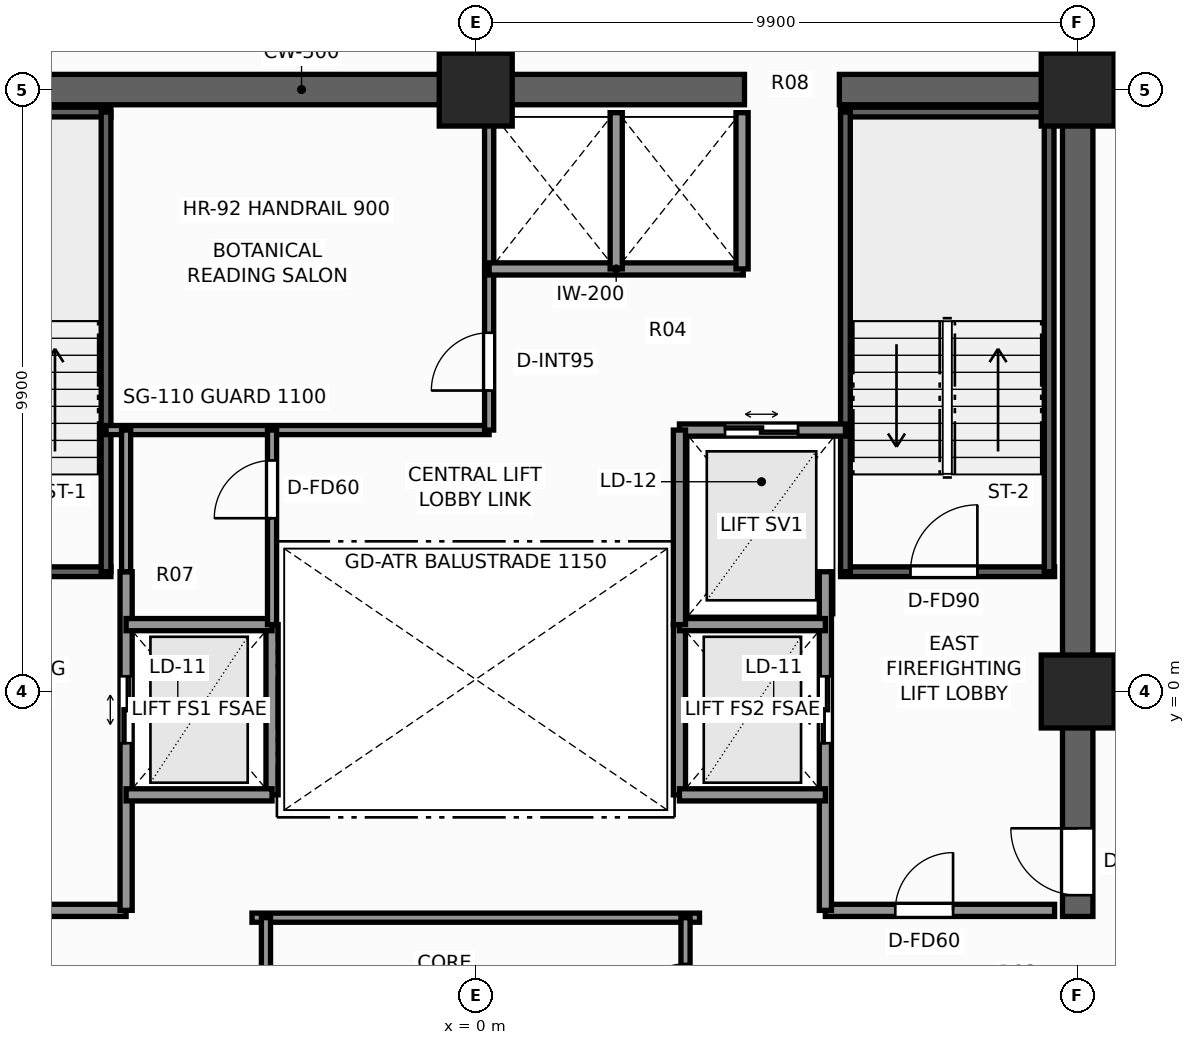
"""IFC4 building model, lengths in metres.
Left out: names, types, materials, properties, quantities, classifications, styles, units other than length and angle.
Written with IfcOpenShell. Run it as: python <this file> out.ifc"""

import sys

from ifc_helpers import new_model, si_unit, direction, frame, frame_2d, origin, origin_2d, place, context, subcontext, project, spatial, rectangle, extrude, element, fill, save


model = new_model("IFC4")
c1 = context("Model", 3, precision=1e-05, world=origin(), true_north=direction((0.0, 1.0)))
c2 = subcontext(c1, "Body", "Model", "MODEL_VIEW")
j1 = project(units=[si_unit("LENGTHUNIT", "METRE"), si_unit("PLANEANGLEUNIT", "RADIAN")], contexts=[c1])
p1 = place(None, origin())
s1 = spatial("IfcSite", under=j1, at=p1, CompositionType="ELEMENT")
p2 = place(p1, origin())
s2 = spatial("IfcBuilding", under=s1, at=p2, CompositionType="ELEMENT")
p3 = place(p2, frame((0.0, 0.0, 118.4)))
s3 = spatial("IfcBuildingStorey", under=s2, at=p3, CompositionType="ELEMENT", Elevation=118.4)
p4 = place(p3, frame((-10.15, 9.9, 0.0), z_axis=(0.0, 0.0, 1.0), x_axis=(1.0, 0.0, 0.0)))
e1 = element("IfcWall", 1, at=p4, inside=s3, PredefinedType="SHEAR", context=c2, shape_type="SweptSolid", body=[
    extrude(rectangle(XDim=14.57, YDim=0.5, at=frame_2d((7.285, 0.0))), origin(), (0.0, 0.0, 1.0), 3.3),
])
p5 = place(p3, frame((5.98, 9.9, 0.0), z_axis=(0.0, 0.0, 1.0), x_axis=(1.0, 0.0, 0.0)))
e2 = element("IfcWall", 2, at=p5, inside=s3, PredefinedType="SHEAR", context=c2, shape_type="SweptSolid", body=[
    extrude(rectangle(XDim=4.17, YDim=0.5, at=frame_2d((2.085, 0.0))), origin(), (0.0, 0.0, 1.0), 3.3),
])
p6 = place(p3, frame((9.9, -3.7, 0.0), z_axis=(0.0, 0.0, 1.0), x_axis=(0.0, 1.0, 0.0)))
e3 = element("IfcWall", 3, at=p6, inside=s3, PredefinedType="SHEAR", context=c2, shape_type="SweptSolid", body=[
    extrude(rectangle(XDim=13.35, YDim=0.5, at=frame_2d((6.675, 0.0))), origin(), (0.0, 0.0, 1.0), 3.3),
])
p7 = place(p6, frame((0.35, 0.0, 0.0)))
e4 = element("IfcOpeningElement", 4, at=p7, cuts=e3, PredefinedType="OPENING", context=c2, shape_type="SweptSolid", body=[
    extrude(rectangle(XDim=1.1, YDim=2.2, at=frame_2d((0.55, 1.1))), frame((0.0, 0.26, 0.0), z_axis=(0.0, -1.0, 0.0), x_axis=(1.0, 0.0, 0.0)), (0.0, 0.0, 1.0), 0.52),
])
for number, where, z_axis, x_axis in (
    (5, (9.9, 9.9, 0.0), (0.0, 0.0, 1.0), (1.0, 0.0, 0.0)),
    (6, (9.9, 0.0, 0.0), (0.0, 0.0, 1.0), (1.0, 0.0, 0.0)),
    (7, (0.0, 9.9, 0.0), (0.0, 0.0, 1.0), (1.0, 0.0, 0.0)),
):
    element("IfcColumn", number, at=place(p3, frame(where, z_axis=z_axis, x_axis=x_axis)), inside=s3, PredefinedType="COLUMN", context=c2, shape_type="SweptSolid", body=[
        extrude(rectangle(XDim=1.2, YDim=1.2, at=origin_2d()), origin(), (0.0, 0.0, 1.0), 3.3),
    ])
p8 = place(p3, frame((-9.52, 1.97, 0.0), z_axis=(0.0, 0.0, 1.0), x_axis=(1.0, 0.0, 0.0)))
e8 = element("IfcWall", 8, at=p8, inside=s3, PredefinedType="SHEAR", context=c2, shape_type="SweptSolid", body=[
    extrude(rectangle(XDim=3.52, YDim=0.16, at=frame_2d((1.76, 0.0))), origin(), (0.0, 0.0, 1.0), 3.3),
])
p9 = place(p8, frame((1.15, 0.0, 0.0)))
e9 = element("IfcOpeningElement", 9, at=p9, cuts=e8, PredefinedType="OPENING", context=c2, shape_type="SweptSolid", body=[
    extrude(rectangle(XDim=1.1, YDim=2.2, at=frame_2d((0.55, 1.1))), frame((0.0, 0.09, 0.0), z_axis=(0.0, -1.0, 0.0), x_axis=(1.0, 0.0, 0.0)), (0.0, 0.0, 1.0), 0.18),
])
p10 = place(p3, frame((-9.52, 9.53, 0.0), z_axis=(0.0, 0.0, 1.0), x_axis=(1.0, 0.0, 0.0)))
e10 = element("IfcWall", 10, at=p10, inside=s3, PredefinedType="SHEAR", context=c2, shape_type="SweptSolid", body=[
    extrude(rectangle(XDim=3.52, YDim=0.16, at=frame_2d((1.76, 0.0))), origin(), (0.0, 0.0, 1.0), 3.3),
])
p11 = place(p3, frame((-6.08, 1.97, 0.0), z_axis=(0.0, 0.0, 1.0), x_axis=(0.0, 1.0, 0.0)))
e11 = element("IfcWall", 11, at=p11, inside=s3, PredefinedType="SHEAR", context=c2, shape_type="SweptSolid", body=[
    extrude(rectangle(XDim=7.56, YDim=0.16, at=frame_2d((3.78, 0.0))), origin(), (0.0, 0.0, 1.0), 3.3),
])
p12 = place(p3, frame((6.0, 1.97, 0.0), z_axis=(0.0, 0.0, 1.0), x_axis=(1.0, 0.0, 0.0)))
e12 = element("IfcWall", 12, at=p12, inside=s3, PredefinedType="SHEAR", context=c2, shape_type="SweptSolid", body=[
    extrude(rectangle(XDim=3.52, YDim=0.16, at=frame_2d((1.76, 0.0))), origin(), (0.0, 0.0, 1.0), 3.3),
])
p13 = place(p12, frame((1.15, 0.0, 0.0)))
e13 = element("IfcOpeningElement", 13, at=p13, cuts=e12, PredefinedType="OPENING", context=c2, shape_type="SweptSolid", body=[
    extrude(rectangle(XDim=1.1, YDim=2.2, at=frame_2d((0.55, 1.1))), frame((0.0, 0.09, 0.0), z_axis=(0.0, -1.0, 0.0), x_axis=(1.0, 0.0, 0.0)), (0.0, 0.0, 1.0), 0.18),
])
p14 = place(p3, frame((6.0, 9.53, 0.0), z_axis=(0.0, 0.0, 1.0), x_axis=(1.0, 0.0, 0.0)))
e14 = element("IfcWall", 14, at=p14, inside=s3, PredefinedType="SHEAR", context=c2, shape_type="SweptSolid", body=[
    extrude(rectangle(XDim=3.52, YDim=0.16, at=frame_2d((1.76, 0.0))), origin(), (0.0, 0.0, 1.0), 3.3),
])
for number, where, z_axis, x_axis in (
    (15, (6.08, 1.97, 0.0), (0.0, 0.0, 1.0), (0.0, 1.0, 0.0)),
    (16, (9.43, 1.97, 0.0), (0.0, 0.0, 1.0), (0.0, 1.0, 0.0)),
):
    element("IfcWall", number, at=place(p3, frame(where, z_axis=z_axis, x_axis=x_axis)), inside=s3, PredefinedType="SHEAR", context=c2, shape_type="SweptSolid", body=[
        extrude(rectangle(XDim=7.56, YDim=0.16, at=frame_2d((3.78, 0.0))), origin(), (0.0, 0.0, 1.0), 3.3),
    ])
p15 = place(p3, frame((-9.52, -3.6, 0.0), z_axis=(0.0, 0.0, 1.0), x_axis=(1.0, 0.0, 0.0)))
e17 = element("IfcWall", 17, at=p15, inside=s3, PredefinedType="SOLIDWALL", context=c2, shape_type="SweptSolid", body=[
    extrude(rectangle(XDim=3.77, YDim=0.2, at=frame_2d((1.885, 0.0))), origin(), (0.0, 0.0, 1.0), 3.08),
])
p16 = place(p15, frame((1.15, 0.0, 0.0)))
e18 = element("IfcOpeningElement", 18, at=p16, cuts=e17, PredefinedType="OPENING", context=c2, shape_type="SweptSolid", body=[
    extrude(rectangle(XDim=0.95, YDim=2.06, at=frame_2d((0.475, 1.03))), frame((0.0, 0.11, 0.0), z_axis=(0.0, -1.0, 0.0), x_axis=(1.0, 0.0, 0.0)), (0.0, 0.0, 1.0), 0.22),
])
p17 = place(p3, frame((-5.75, -3.6, 0.0), z_axis=(0.0, 0.0, 1.0), x_axis=(0.0, 1.0, 0.0)))
e19 = element("IfcWall", 19, at=p17, inside=s3, PredefinedType="SOLIDWALL", context=c2, shape_type="SweptSolid", body=[
    extrude(rectangle(XDim=5.57, YDim=0.2, at=frame_2d((2.785, 0.0))), origin(), (0.0, 0.0, 1.0), 2.715),
])
p18 = place(p17, frame((2.75, 0.0, 0.0)))
e20 = element("IfcOpeningElement", 20, at=p18, cuts=e19, PredefinedType="OPENING", context=c2, shape_type="SweptSolid", body=[
    extrude(rectangle(XDim=1.1, YDim=2.2, at=frame_2d((0.55, 1.1))), frame((0.0, 0.11, 0.0), z_axis=(0.0, -1.0, 0.0), x_axis=(1.0, 0.0, 0.0)), (0.0, 0.0, 1.0), 0.22),
])
p19 = place(p3, frame((-3.35, -1.7, 0.0), z_axis=(0.0, 0.0, 1.0), x_axis=(0.0, 1.0, 0.0)))
e21 = element("IfcWall", 21, at=p19, inside=s3, PredefinedType="SOLIDWALL", context=c2, shape_type="SweptSolid", body=[
    extrude(rectangle(XDim=2.8, YDim=0.2, at=frame_2d((1.4, 0.0))), origin(), (0.0, 0.0, 1.0), 2.715),
])
for number, where, z_axis, x_axis in (
    (22, (-5.75, -1.7, 0.0), (0.0, 0.0, 1.0), (1.0, 0.0, 0.0)),
    (23, (-5.75, 1.1, 0.0), (0.0, 0.0, 1.0), (1.0, 0.0, 0.0)),
):
    element("IfcWall", number, at=place(p3, frame(where, z_axis=z_axis, x_axis=x_axis)), inside=s3, PredefinedType="SOLIDWALL", context=c2, shape_type="SweptSolid", body=[
        extrude(rectangle(XDim=2.4, YDim=0.2, at=frame_2d((1.2, 0.0))), origin(), (0.0, 0.0, 1.0), 3.08),
    ])
p20 = place(p3, frame((5.75, -3.6, 0.0), z_axis=(0.0, 0.0, 1.0), x_axis=(1.0, 0.0, 0.0)))
e24 = element("IfcWall", 24, at=p20, inside=s3, PredefinedType="SOLIDWALL", context=c2, shape_type="SweptSolid", body=[
    extrude(rectangle(XDim=3.77, YDim=0.2, at=frame_2d((1.885, 0.0))), origin(), (0.0, 0.0, 1.0), 3.08),
])
p21 = place(p20, frame((1.15, 0.0, 0.0)))
e25 = element("IfcOpeningElement", 25, at=p21, cuts=e24, PredefinedType="OPENING", context=c2, shape_type="SweptSolid", body=[
    extrude(rectangle(XDim=0.95, YDim=2.06, at=frame_2d((0.475, 1.03))), frame((0.0, 0.11, 0.0), z_axis=(0.0, -1.0, 0.0), x_axis=(1.0, 0.0, 0.0)), (0.0, 0.0, 1.0), 0.22),
])
p22 = place(p3, frame((5.75, -3.6, 0.0), z_axis=(0.0, 0.0, 1.0), x_axis=(0.0, 1.0, 0.0)))
e26 = element("IfcWall", 26, at=p22, inside=s3, PredefinedType="SOLIDWALL", context=c2, shape_type="SweptSolid", body=[
    extrude(rectangle(XDim=5.57, YDim=0.2, at=frame_2d((2.785, 0.0))), origin(), (0.0, 0.0, 1.0), 2.715),
])
p23 = place(p22, frame((2.75, 0.0, 0.0)))
e27 = element("IfcOpeningElement", 27, at=p23, cuts=e26, PredefinedType="OPENING", context=c2, shape_type="SweptSolid", body=[
    extrude(rectangle(XDim=1.1, YDim=2.2, at=frame_2d((0.55, 1.1))), frame((0.0, 0.11, 0.0), z_axis=(0.0, -1.0, 0.0), x_axis=(1.0, 0.0, 0.0)), (0.0, 0.0, 1.0), 0.22),
])
p24 = place(p3, frame((3.35, -1.7, 0.0), z_axis=(0.0, 0.0, 1.0), x_axis=(0.0, 1.0, 0.0)))
e28 = element("IfcWall", 28, at=p24, inside=s3, PredefinedType="SOLIDWALL", context=c2, shape_type="SweptSolid", body=[
    extrude(rectangle(XDim=2.8, YDim=0.2, at=frame_2d((1.4, 0.0))), origin(), (0.0, 0.0, 1.0), 2.715),
])
for number, where, z_axis, x_axis in (
    (29, (3.35, -1.7, 0.0), (0.0, 0.0, 1.0), (1.0, 0.0, 0.0)),
    (30, (3.35, 1.1, 0.0), (0.0, 0.0, 1.0), (1.0, 0.0, 0.0)),
):
    element("IfcWall", number, at=place(p3, frame(where, z_axis=z_axis, x_axis=x_axis)), inside=s3, PredefinedType="SOLIDWALL", context=c2, shape_type="SweptSolid", body=[
        extrude(rectangle(XDim=2.4, YDim=0.2, at=frame_2d((1.2, 0.0))), origin(), (0.0, 0.0, 1.0), 3.08),
    ])
p25 = place(p3, frame((3.35, 4.3, 0.0), z_axis=(0.0, 0.0, 1.0), x_axis=(1.0, 0.0, 0.0)))
e31 = element("IfcWall", 31, at=p25, inside=s3, PredefinedType="SOLIDWALL", context=c2, shape_type="SweptSolid", body=[
    extrude(rectangle(XDim=2.73, YDim=0.2, at=frame_2d((1.365, 0.0))), origin(), (0.0, 0.0, 1.0), 3.08),
])
p26 = place(p25, frame((0.75, 0.0, 0.0)))
e32 = element("IfcOpeningElement", 32, at=p26, cuts=e31, PredefinedType="OPENING", context=c2, shape_type="SweptSolid", body=[
    extrude(rectangle(XDim=1.2, YDim=2.25, at=frame_2d((0.6, 1.125))), frame((0.0, 0.11, 0.0), z_axis=(0.0, -1.0, 0.0), x_axis=(1.0, 0.0, 0.0)), (0.0, 0.0, 1.0), 0.22),
])
p27 = place(p3, frame((3.35, 1.1, 0.0), z_axis=(0.0, 0.0, 1.0), x_axis=(0.0, 1.0, 0.0)))
e33 = element("IfcWall", 33, at=p27, inside=s3, PredefinedType="SOLIDWALL", context=c2, shape_type="SweptSolid", body=[
    extrude(rectangle(XDim=3.2, YDim=0.2, at=frame_2d((1.6, 0.0))), origin(), (0.0, 0.0, 1.0), 2.715),
])
p28 = place(p3, frame((-6.08, 4.3, 0.0), z_axis=(0.0, 0.0, 1.0), x_axis=(1.0, 0.0, 0.0)))
e34 = element("IfcWall", 34, at=p28, inside=s3, PredefinedType="PARTITIONING", context=c2, shape_type="SweptSolid", body=[
    extrude(rectangle(XDim=6.3, YDim=0.15, at=frame_2d((3.15, 0.0))), origin(), (0.0, 0.0, 1.0), 3.08),
])
p29 = place(p3, frame((0.22, 4.3, 0.0), z_axis=(0.0, 0.0, 1.0), x_axis=(0.0, 1.0, 0.0)))
e35 = element("IfcWall", 35, at=p29, inside=s3, PredefinedType="PARTITIONING", context=c2, shape_type="SweptSolid", body=[
    extrude(rectangle(XDim=5.22, YDim=0.15, at=frame_2d((2.61, 0.0))), origin(), (0.0, 0.0, 1.0), 3.08),
])
p30 = place(p29, frame((0.65, 0.0, 0.0)))
e36 = element("IfcOpeningElement", 36, at=p30, cuts=e35, PredefinedType="OPENING", context=c2, shape_type="SweptSolid", body=[
    extrude(rectangle(XDim=0.95, YDim=2.06, at=frame_2d((0.475, 1.03))), frame((0.0, 0.085, 0.0), z_axis=(0.0, -1.0, 0.0), x_axis=(1.0, 0.0, 0.0)), (0.0, 0.0, 1.0), 0.17),
])
p31 = place(p3, frame((0.22, 6.95, 0.0), z_axis=(0.0, 0.0, 1.0), x_axis=(1.0, 0.0, 0.0)))
e37 = element("IfcWall", 37, at=p31, inside=s3, PredefinedType="SOLIDWALL", context=c2, shape_type="SweptSolid", body=[
    extrude(rectangle(XDim=4.18, YDim=0.2, at=frame_2d((2.09, 0.0))), origin(), (0.0, 0.0, 1.0), 3.08),
])
for number, where, z_axis, x_axis in (
    (38, (4.38, 6.95, 0.0), (0.0, 0.0, 1.0), (0.0, 1.0, 0.0)),
    (39, (2.31, 6.95, 0.0), (0.0, 0.0, 1.0), (0.0, 1.0, 0.0)),
):
    element("IfcWall", number, at=place(p3, frame(where, z_axis=z_axis, x_axis=x_axis)), inside=s3, PredefinedType="SOLIDWALL", context=c2, shape_type="SweptSolid", body=[
        extrude(rectangle(XDim=2.57, YDim=0.2, at=frame_2d((1.285, 0.0))), origin(), (0.0, 0.0, 1.0), 3.08),
    ])
p32 = place(p3, frame((-3.68, -3.72, 0.0), z_axis=(0.0, 0.0, 1.0), x_axis=(1.0, 0.0, 0.0)))
e40 = element("IfcWall", 40, at=p32, inside=s3, PredefinedType="PARTITIONING", context=c2, shape_type="SweptSolid", body=[
    extrude(rectangle(XDim=7.36, YDim=0.15, at=frame_2d((3.68, 0.0))), origin(), (0.0, 0.0, 1.0), 3.08),
])
p33 = place(p3, frame((3.45, -6.08, 0.0), z_axis=(0.0, 0.0, 1.0), x_axis=(0.0, 1.0, 0.0)))
e41 = element("IfcWall", 41, at=p33, inside=s3, PredefinedType="PARTITIONING", context=c2, shape_type="SweptSolid", body=[
    extrude(rectangle(XDim=2.36, YDim=0.15, at=frame_2d((1.18, 0.0))), origin(), (0.0, 0.0, 1.0), 3.08),
])
p34 = place(p33, frame((0.65, 0.0, 0.0)))
e42 = element("IfcOpeningElement", 42, at=p34, cuts=e41, PredefinedType="OPENING", context=c2, shape_type="SweptSolid", body=[
    extrude(rectangle(XDim=0.95, YDim=2.06, at=frame_2d((0.475, 1.03))), frame((0.0, 0.085, 0.0), z_axis=(0.0, -1.0, 0.0), x_axis=(1.0, 0.0, 0.0)), (0.0, 0.0, 1.0), 0.17),
])
p35 = place(p3, frame((-3.45, -6.08, 0.0), z_axis=(0.0, 0.0, 1.0), x_axis=(0.0, 1.0, 0.0)))
e43 = element("IfcWall", 43, at=p35, inside=s3, PredefinedType="PARTITIONING", context=c2, shape_type="SweptSolid", body=[
    extrude(rectangle(XDim=2.36, YDim=0.15, at=frame_2d((1.18, 0.0))), origin(), (0.0, 0.0, 1.0), 3.08),
])
p36 = place(p3, frame((-3.35, 1.1, 0.0), z_axis=(0.0, 0.0, 1.0), x_axis=(0.0, 1.0, 0.0)))
e44 = element("IfcWall", 44, at=p36, inside=s3, PredefinedType="PARTITIONING", context=c2, shape_type="SweptSolid", body=[
    extrude(rectangle(XDim=3.2, YDim=0.15, at=frame_2d((1.6, 0.0))), origin(), (0.0, 0.0, 1.0), 2.715),
])
p37 = place(p36, frame((1.75, 0.0, 0.0)))
e45 = element("IfcOpeningElement", 45, at=p37, cuts=e44, PredefinedType="OPENING", context=c2, shape_type="SweptSolid", body=[
    extrude(rectangle(XDim=0.95, YDim=2.06, at=frame_2d((0.475, 1.03))), frame((0.0, 0.085, 0.0), z_axis=(0.0, -1.0, 0.0), x_axis=(1.0, 0.0, 0.0)), (0.0, 0.0, 1.0), 0.17),
])
p38 = place(p3, frame((-5.75, 1.97, 0.0), z_axis=(0.0, 0.0, 1.0), x_axis=(0.0, 1.0, 0.0)))
e46 = element("IfcWall", 46, at=p38, inside=s3, PredefinedType="PARTITIONING", context=c2, shape_type="SweptSolid", body=[
    extrude(rectangle(XDim=2.33, YDim=0.15, at=frame_2d((1.165, 0.0))), origin(), (0.0, 0.0, 1.0), 2.715),
])
p39 = place(p13, origin())
e47 = element("IfcDoor", 47, at=p39, inside=s3, OperationType="SINGLE_SWING_RIGHT", PredefinedType="DOOR", context=c2, shape_type="SweptSolid", body=[
    extrude(rectangle(XDim=1.1, YDim=2.2, at=frame_2d((0.55, 1.1))), frame((0.0, 0.025, 0.0), z_axis=(0.0, -1.0, 0.0), x_axis=(1.0, 0.0, 0.0)), (0.0, 0.0, 1.0), 0.05),
])
fill(e13, e47)
p40 = place(p18, origin())
e48 = element("IfcDoor", 48, at=p40, inside=s3, OperationType="DOUBLE_DOOR_SLIDING", PredefinedType="DOOR", context=c2, shape_type="SweptSolid", body=[
    extrude(rectangle(XDim=1.1, YDim=2.2, at=frame_2d((0.55, 1.1))), frame((0.0, 0.025, 0.0), z_axis=(0.0, -1.0, 0.0), x_axis=(1.0, 0.0, 0.0)), (0.0, 0.0, 1.0), 0.05),
])
fill(e20, e48)
p41 = place(p7, origin())
e49 = element("IfcDoor", 49, at=p41, inside=s3, OperationType="SINGLE_SWING_RIGHT", PredefinedType="DOOR", context=c2, shape_type="SweptSolid", body=[
    extrude(rectangle(XDim=1.1, YDim=2.2, at=frame_2d((0.55, 1.1))), frame((0.0, 0.025, 0.0), z_axis=(0.0, -1.0, 0.0), x_axis=(1.0, 0.0, 0.0)), (0.0, 0.0, 1.0), 0.05),
])
fill(e4, e49)
p42 = place(p23, origin())
e50 = element("IfcDoor", 50, at=p42, inside=s3, OperationType="DOUBLE_DOOR_SLIDING", PredefinedType="DOOR", context=c2, shape_type="SweptSolid", body=[
    extrude(rectangle(XDim=1.1, YDim=2.2, at=frame_2d((0.55, 1.1))), frame((0.0, 0.025, 0.0), z_axis=(0.0, -1.0, 0.0), x_axis=(1.0, 0.0, 0.0)), (0.0, 0.0, 1.0), 0.05),
])
fill(e27, e50)
p43 = place(p26, origin())
e51 = element("IfcDoor", 51, at=p43, inside=s3, OperationType="DOUBLE_DOOR_SLIDING", PredefinedType="DOOR", context=c2, shape_type="SweptSolid", body=[
    extrude(rectangle(XDim=1.2, YDim=2.25, at=frame_2d((0.6, 1.125))), frame((0.0, 0.025, 0.0), z_axis=(0.0, -1.0, 0.0), x_axis=(1.0, 0.0, 0.0)), (0.0, 0.0, 1.0), 0.05),
])
fill(e32, e51)
p44 = place(p30, origin())
e52 = element("IfcDoor", 52, at=p44, inside=s3, OperationType="SINGLE_SWING_LEFT", PredefinedType="DOOR", context=c2, shape_type="SweptSolid", body=[
    extrude(rectangle(XDim=0.95, YDim=2.06, at=frame_2d((0.475, 1.03))), frame((0.0, 0.025, 0.0), z_axis=(0.0, -1.0, 0.0), x_axis=(1.0, 0.0, 0.0)), (0.0, 0.0, 1.0), 0.05),
])
fill(e36, e52)
p45 = place(p21, origin())
e53 = element("IfcDoor", 53, at=p45, inside=s3, OperationType="SINGLE_SWING_RIGHT", PredefinedType="DOOR", context=c2, shape_type="SweptSolid", body=[
    extrude(rectangle(XDim=0.95, YDim=2.06, at=frame_2d((0.475, 1.03))), frame((0.0, 0.025, 0.0), z_axis=(0.0, -1.0, 0.0), x_axis=(1.0, 0.0, 0.0)), (0.0, 0.0, 1.0), 0.05),
])
fill(e25, e53)
p46 = place(p34, origin())
e54 = element("IfcDoor", 54, at=p46, inside=s3, OperationType="SINGLE_SWING_LEFT", PredefinedType="DOOR", context=c2, shape_type="SweptSolid", body=[
    extrude(rectangle(XDim=0.95, YDim=2.06, at=frame_2d((0.475, 1.03))), frame((0.0, 0.025, 0.0), z_axis=(0.0, -1.0, 0.0), x_axis=(1.0, 0.0, 0.0)), (0.0, 0.0, 1.0), 0.05),
])
fill(e42, e54)
p47 = place(p37, origin())
e55 = element("IfcDoor", 55, at=p47, inside=s3, OperationType="SINGLE_SWING_LEFT", PredefinedType="DOOR", context=c2, shape_type="SweptSolid", body=[
    extrude(rectangle(XDim=0.95, YDim=2.06, at=frame_2d((0.475, 1.03))), frame((0.0, 0.025, 0.0), z_axis=(0.0, -1.0, 0.0), x_axis=(1.0, 0.0, 0.0)), (0.0, 0.0, 1.0), 0.05),
])
fill(e45, e55)
save(model, sys.argv[1])
